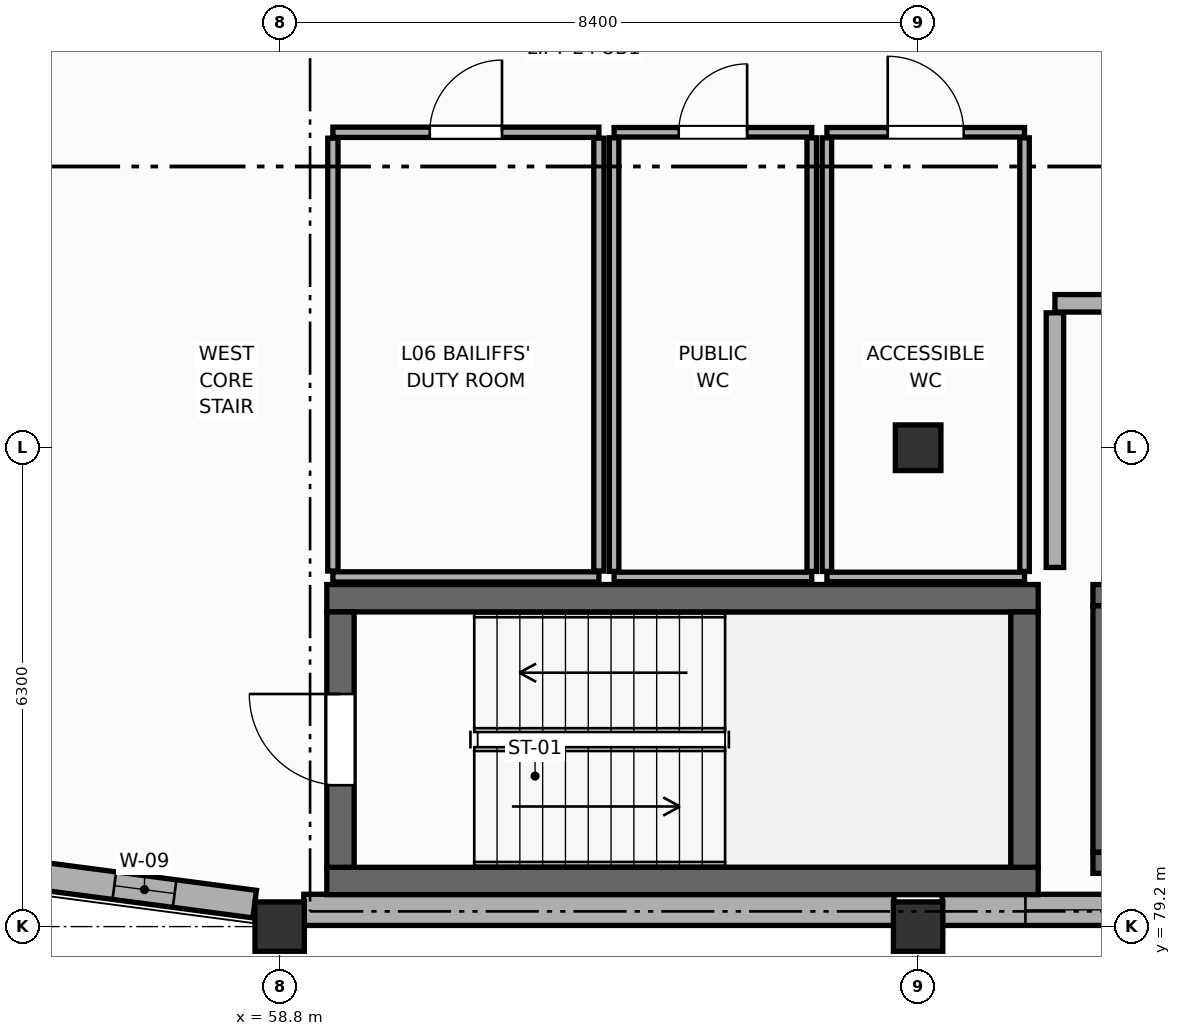
"""IFC4 building model, lengths in metres.
Left out: names, types, materials, properties, quantities, classifications, styles, units other than length and angle.
Written with IfcOpenShell. Run it as: python <this file> out.ifc"""

import sys

from ifc_helpers import new_model, si_unit, direction, frame, frame_2d, origin, origin_2d, place, context, subcontext, project, spatial, rectangle, extrude, element, fill, save


model = new_model("IFC4")
c1 = context("Model", 3, precision=1e-05, world=origin(), true_north=direction((0.0, 1.0)))
c2 = subcontext(c1, "Body", "Model", "MODEL_VIEW")
j1 = project(units=[si_unit("LENGTHUNIT", "METRE"), si_unit("PLANEANGLEUNIT", "RADIAN")], contexts=[c1])
p1 = place(None, origin())
s1 = spatial("IfcSite", under=j1, at=p1, CompositionType="ELEMENT")
p2 = place(p1, origin())
s2 = spatial("IfcBuilding", under=s1, at=p2, CompositionType="ELEMENT")
p3 = place(p2, frame((0.0, 0.0, 22.8)))
s3 = spatial("IfcBuildingStorey", under=s2, at=p3, CompositionType="ELEMENT", Elevation=22.8)
for number, where, z_axis, x_axis in (
    (1, (58.8, 79.2, 0.0), (0.0, 0.0, 1.0), (1.0, 0.0, 0.0)),
    (2, (67.2, 79.2, 0.0), (0.0, 0.0, 1.0), (1.0, 0.0, 0.0)),
):
    element("IfcColumn", number, at=place(p3, frame(where, z_axis=z_axis, x_axis=x_axis)), inside=s3, PredefinedType="COLUMN", context=c2, shape_type="SweptSolid", body=[
        extrude(rectangle(XDim=0.65, YDim=0.65, at=origin_2d()), origin(), (0.0, 0.0, 1.0), 4.2),
    ])
p4 = place(p3, frame((67.2, 85.5, 0.0), z_axis=(0.0, 0.0, 1.0), x_axis=(1.0, 0.0, 0.0)))
e3 = element("IfcColumn", 3, at=p4, inside=s3, PredefinedType="COLUMN", context=c2, shape_type="SweptSolid", body=[
    extrude(rectangle(XDim=0.6, YDim=0.6, at=origin_2d()), origin(), (0.0, 0.0, 1.0), 4.2),
])
p5 = place(p3, frame((66.883, 79.42, 0.0), z_axis=(0.0, 0.0, 1.0), x_axis=(-1.0, 0.0, 0.0)))
e4 = element("IfcWall", 4, at=p5, inside=s3, PredefinedType="STANDARD", context=c2, shape_type="SweptSolid", body=[
    extrude(rectangle(XDim=7.766, YDim=0.41, at=frame_2d((3.883, 0.0))), origin(), (0.0, 0.0, 1.0), 3.1),
])
p6 = place(p3, frame((75.283, 79.42, 0.0), z_axis=(0.0, 0.0, 1.0), x_axis=(-1.0, 0.0, 0.0)))
e5 = element("IfcWall", 5, at=p6, inside=s3, PredefinedType="STANDARD", context=c2, shape_type="SweptSolid", body=[
    extrude(rectangle(XDim=7.766, YDim=0.41, at=frame_2d((3.883, 0.0))), origin(), (0.0, 0.0, 1.0), 3.5),
])
p7 = place(p6, frame((1.095, 0.0, 0.85)))
e6 = element("IfcOpeningElement", 6, at=p7, cuts=e5, PredefinedType="OPENING", context=c2, shape_type="SweptSolid", body=[
    extrude(rectangle(XDim=1.35, YDim=1.95, at=frame_2d((0.675, 0.975))), frame((0.0, 0.215, 0.0), z_axis=(0.0, -1.0, 0.0), x_axis=(1.0, 0.0, 0.0)), (0.0, 0.0, 1.0), 0.43),
])
p8 = place(p6, frame((3.208, 0.0, 0.85)))
e7 = element("IfcOpeningElement", 7, at=p8, cuts=e5, PredefinedType="OPENING", context=c2, shape_type="SweptSolid", body=[
    extrude(rectangle(XDim=1.35, YDim=1.95, at=frame_2d((0.675, 0.975))), frame((0.0, 0.215, 0.0), z_axis=(0.0, -1.0, 0.0), x_axis=(1.0, 0.0, 0.0)), (0.0, 0.0, 1.0), 0.43),
])
p9 = place(p6, frame((5.321, 0.0, 0.85)))
e8 = element("IfcOpeningElement", 8, at=p9, cuts=e5, PredefinedType="OPENING", context=c2, shape_type="SweptSolid", body=[
    extrude(rectangle(XDim=1.35, YDim=1.95, at=frame_2d((0.675, 0.975))), frame((0.0, 0.215, 0.0), z_axis=(0.0, -1.0, 0.0), x_axis=(1.0, 0.0, 0.0)), (0.0, 0.0, 1.0), 0.43),
])
p10 = place(p3, frame((55.572, 79.877, 0.0), z_axis=(0.0, 0.0, 1.0), x_axis=(0.99144889538, -0.13049554724, 0.0)))
e9 = element("IfcWall", 9, at=p10, inside=s3, PredefinedType="ELEMENTEDWALL", context=c2, shape_type="SweptSolid", body=[
    extrude(rectangle(XDim=2.924, YDim=0.365, at=frame_2d((1.462, 0.0))), origin(), (0.0, 0.0, 1.0), 3.1),
])
p11 = place(p10, frame((1.062, 0.0, 0.85)))
e10 = element("IfcOpeningElement", 10, at=p11, cuts=e9, PredefinedType="OPENING", context=c2, shape_type="SweptSolid", body=[
    extrude(rectangle(XDim=0.8, YDim=1.7, at=frame_2d((0.4, 0.85))), frame((0.0, 0.192, 0.0), z_axis=(0.0, -1.0, 0.0), x_axis=(1.0, 0.0, 0.0)), (0.0, 0.0, 1.0), 0.385),
])
for number, where, z_axis, x_axis in (
    (11, (59.42, 83.52, 0.0), (0.0, 0.0, 1.0), (1.0, 0.0, 0.0)),
    (12, (68.78, 79.8, 0.0), (0.0, 0.0, 1.0), (-1.0, 0.0, 0.0)),
):
    element("IfcWall", number, at=place(p3, frame(where, z_axis=z_axis, x_axis=x_axis)), inside=s3, PredefinedType="SHEAR", context=c2, shape_type="SweptSolid", body=[
        extrude(rectangle(XDim=9.36, YDim=0.36, at=frame_2d((4.68, 0.0))), origin(), (0.0, 0.0, 1.0), 3.97),
    ])
p12 = place(p3, frame((59.6, 79.98, 0.0), z_axis=(0.0, 0.0, 1.0), x_axis=(0.0, 1.0, 0.0)))
e13 = element("IfcWall", 13, at=p12, inside=s3, PredefinedType="SHEAR", context=c2, shape_type="SweptSolid", body=[
    extrude(rectangle(XDim=3.36, YDim=0.36, at=frame_2d((1.68, 0.0))), origin(), (0.0, 0.0, 1.0), 3.97),
])
p13 = place(p12, frame((1.08, 0.0, 0.0)))
e14 = element("IfcOpeningElement", 14, at=p13, cuts=e13, PredefinedType="OPENING", context=c2, shape_type="SweptSolid", body=[
    extrude(rectangle(XDim=1.2, YDim=2.2, at=frame_2d((0.6, 1.1))), frame((0.0, 0.19, 0.0), z_axis=(0.0, -1.0, 0.0), x_axis=(1.0, 0.0, 0.0)), (0.0, 0.0, 1.0), 0.38),
])
p14 = place(p3, frame((68.6, 83.34, 0.0), z_axis=(0.0, 0.0, 1.0), x_axis=(0.0, -1.0, 0.0)))
e15 = element("IfcWall", 15, at=p14, inside=s3, PredefinedType="SHEAR", context=c2, shape_type="SweptSolid", body=[
    extrude(rectangle(XDim=3.36, YDim=0.36, at=frame_2d((1.68, 0.0))), origin(), (0.0, 0.0, 1.0), 3.97),
])
p15 = place(p3, frame((69.5, 83.56, 0.0), z_axis=(0.0, 0.0, 1.0), x_axis=(1.0, 0.0, 0.0)))
e16 = element("IfcWall", 16, at=p15, inside=s3, PredefinedType="SHEAR", context=c2, shape_type="SweptSolid", body=[
    extrude(rectangle(XDim=3.0, YDim=0.28, at=frame_2d((1.5, 0.0))), origin(), (0.0, 0.0, 1.0), 3.97),
])
p16 = place(p15, frame((0.95, 0.0, 0.0)))
e17 = element("IfcOpeningElement", 17, at=p16, cuts=e16, PredefinedType="OPENING", context=c2, shape_type="SweptSolid", body=[
    extrude(rectangle(XDim=1.1, YDim=2.2, at=frame_2d((0.55, 1.1))), frame((0.0, 0.15, 0.0), z_axis=(0.0, -1.0, 0.0), x_axis=(1.0, 0.0, 0.0)), (0.0, 0.0, 1.0), 0.3),
])
p17 = place(p3, frame((72.5, 80.04, 0.0), z_axis=(0.0, 0.0, 1.0), x_axis=(-1.0, 0.0, 0.0)))
e18 = element("IfcWall", 18, at=p17, inside=s3, PredefinedType="SHEAR", context=c2, shape_type="SweptSolid", body=[
    extrude(rectangle(XDim=3.0, YDim=0.28, at=frame_2d((1.5, 0.0))), origin(), (0.0, 0.0, 1.0), 3.97),
])
p18 = place(p3, frame((69.64, 80.18, 0.0), z_axis=(0.0, 0.0, 1.0), x_axis=(0.0, 1.0, 0.0)))
e19 = element("IfcWall", 19, at=p18, inside=s3, PredefinedType="SHEAR", context=c2, shape_type="SweptSolid", body=[
    extrude(rectangle(XDim=3.24, YDim=0.28, at=frame_2d((1.62, 0.0))), origin(), (0.0, 0.0, 1.0), 3.97),
])
p19 = place(p3, frame((69.0, 87.4, 0.0), z_axis=(0.0, 0.0, 1.0), x_axis=(1.0, 0.0, 0.0)))
e20 = element("IfcWall", 20, at=p19, inside=s3, PredefinedType="STANDARD", context=c2, shape_type="SweptSolid", body=[
    extrude(rectangle(XDim=5.4, YDim=0.23, at=frame_2d((2.7, 0.0))), origin(), (0.0, 0.0, 1.0), 3.955),
])
p20 = place(p19, frame((2.05, 0.0, 0.0)))
e21 = element("IfcOpeningElement", 21, at=p20, cuts=e20, PredefinedType="OPENING", context=c2, shape_type="SweptSolid", body=[
    extrude(rectangle(XDim=1.3, YDim=2.2, at=frame_2d((0.65, 1.1))), frame((0.0, 0.125, 0.0), z_axis=(0.0, -1.0, 0.0), x_axis=(1.0, 0.0, 0.0)), (0.0, 0.0, 1.0), 0.25),
])
p21 = place(p3, frame((69.0, 83.925, 0.0), z_axis=(0.0, 0.0, 1.0), x_axis=(0.0, 1.0, 0.0)))
e22 = element("IfcWall", 22, at=p21, inside=s3, PredefinedType="STANDARD", context=c2, shape_type="SweptSolid", body=[
    extrude(rectangle(XDim=3.35, YDim=0.23, at=frame_2d((1.675, 0.0))), origin(), (0.0, 0.0, 1.0), 3.4),
])
p22 = place(p3, frame((63.2, 89.65, 0.0), z_axis=(0.0, 0.0, 1.0), x_axis=(1.0, 0.0, 0.0)))
e23 = element("IfcWall", 23, at=p22, inside=s3, PredefinedType="PARTITIONING", context=c2, shape_type="SweptSolid", body=[
    extrude(rectangle(XDim=2.6, YDim=0.125, at=frame_2d((1.3, 0.0))), origin(), (0.0, 0.0, 1.0), 3.955),
])
p23 = place(p22, frame((0.85, 0.0, 0.0)))
e24 = element("IfcOpeningElement", 24, at=p23, cuts=e23, PredefinedType="OPENING", context=c2, shape_type="SweptSolid", body=[
    extrude(rectangle(XDim=0.9, YDim=2.1, at=frame_2d((0.45, 1.05))), frame((0.0, 0.073, 0.0), z_axis=(0.0, -1.0, 0.0), x_axis=(1.0, 0.0, 0.0)), (0.0, 0.0, 1.0), 0.145),
])
p24 = place(p3, frame((65.8, 83.8, 0.0), z_axis=(0.0, 0.0, 1.0), x_axis=(-1.0, 0.0, 0.0)))
e25 = element("IfcWall", 25, at=p24, inside=s3, PredefinedType="PARTITIONING", context=c2, shape_type="SweptSolid", body=[
    extrude(rectangle(XDim=2.6, YDim=0.125, at=frame_2d((1.3, 0.0))), origin(), (0.0, 0.0, 1.0), 3.955),
])
for number, where, z_axis, x_axis in (
    (26, (63.2, 83.873, 0.0), (0.0, 0.0, 1.0), (0.0, 1.0, 0.0)),
    (27, (65.8, 89.577, 0.0), (0.0, 0.0, 1.0), (0.0, -1.0, 0.0)),
):
    element("IfcWall", number, at=place(p3, frame(where, z_axis=z_axis, x_axis=x_axis)), inside=s3, PredefinedType="PARTITIONING", context=c2, shape_type="SweptSolid", body=[
        extrude(rectangle(XDim=5.705, YDim=0.125, at=frame_2d((2.853, 0.0))), origin(), (0.0, 0.0, 1.0), 3.955),
    ])
p25 = place(p3, frame((66.0, 89.65, 0.0), z_axis=(0.0, 0.0, 1.0), x_axis=(1.0, 0.0, 0.0)))
e28 = element("IfcWall", 28, at=p25, inside=s3, PredefinedType="PARTITIONING", context=c2, shape_type="SweptSolid", body=[
    extrude(rectangle(XDim=2.6, YDim=0.125, at=frame_2d((1.3, 0.0))), origin(), (0.0, 0.0, 1.0), 3.5),
])
p26 = place(p25, frame((0.8, 0.0, 0.0)))
e29 = element("IfcOpeningElement", 29, at=p26, cuts=e28, PredefinedType="OPENING", context=c2, shape_type="SweptSolid", body=[
    extrude(rectangle(XDim=1.0, YDim=2.1, at=frame_2d((0.5, 1.05))), frame((0.0, 0.073, 0.0), z_axis=(0.0, -1.0, 0.0), x_axis=(1.0, 0.0, 0.0)), (0.0, 0.0, 1.0), 0.145),
])
p27 = place(p3, frame((68.6, 83.8, 0.0), z_axis=(0.0, 0.0, 1.0), x_axis=(-1.0, 0.0, 0.0)))
e30 = element("IfcWall", 30, at=p27, inside=s3, PredefinedType="PARTITIONING", context=c2, shape_type="SweptSolid", body=[
    extrude(rectangle(XDim=2.6, YDim=0.125, at=frame_2d((1.3, 0.0))), origin(), (0.0, 0.0, 1.0), 3.5),
])
p28 = place(p3, frame((66.0, 83.873, 0.0), z_axis=(0.0, 0.0, 1.0), x_axis=(0.0, 1.0, 0.0)))
e31 = element("IfcWall", 31, at=p28, inside=s3, PredefinedType="PARTITIONING", context=c2, shape_type="SweptSolid", body=[
    extrude(rectangle(XDim=5.705, YDim=0.125, at=frame_2d((2.853, 0.0))), origin(), (0.0, 0.0, 1.0), 3.955),
])
p29 = place(p3, frame((68.6, 89.577, 0.0), z_axis=(0.0, 0.0, 1.0), x_axis=(0.0, -1.0, 0.0)))
e32 = element("IfcWall", 32, at=p29, inside=s3, PredefinedType="PARTITIONING", context=c2, shape_type="SweptSolid", body=[
    extrude(rectangle(XDim=5.705, YDim=0.125, at=frame_2d((2.853, 0.0))), origin(), (0.0, 0.0, 1.0), 3.4),
])
p30 = place(p3, frame((59.5, 89.65, 0.0), z_axis=(0.0, 0.0, 1.0), x_axis=(1.0, 0.0, 0.0)))
e33 = element("IfcWall", 33, at=p30, inside=s3, PredefinedType="PARTITIONING", context=c2, shape_type="SweptSolid", body=[
    extrude(rectangle(XDim=3.5, YDim=0.135, at=frame_2d((1.75, 0.0))), origin(), (0.0, 0.0, 1.0), 3.955),
])
p31 = place(p30, frame((1.275, 0.0, 0.0)))
e34 = element("IfcOpeningElement", 34, at=p31, cuts=e33, PredefinedType="OPENING", context=c2, shape_type="SweptSolid", body=[
    extrude(rectangle(XDim=0.95, YDim=2.15, at=frame_2d((0.475, 1.075))), frame((0.0, 0.077, 0.0), z_axis=(0.0, -1.0, 0.0), x_axis=(1.0, 0.0, 0.0)), (0.0, 0.0, 1.0), 0.155),
])
p32 = place(p3, frame((63.0, 83.8, 0.0), z_axis=(0.0, 0.0, 1.0), x_axis=(-1.0, 0.0, 0.0)))
e35 = element("IfcWall", 35, at=p32, inside=s3, PredefinedType="PARTITIONING", context=c2, shape_type="SweptSolid", body=[
    extrude(rectangle(XDim=3.5, YDim=0.135, at=frame_2d((1.75, 0.0))), origin(), (0.0, 0.0, 1.0), 3.955),
])
for number, where, z_axis, x_axis in (
    (36, (59.5, 83.877, 0.0), (0.0, 0.0, 1.0), (0.0, 1.0, 0.0)),
    (37, (63.0, 89.573, 0.0), (0.0, 0.0, 1.0), (0.0, -1.0, 0.0)),
):
    element("IfcWall", number, at=place(p3, frame(where, z_axis=z_axis, x_axis=x_axis)), inside=s3, PredefinedType="PARTITIONING", context=c2, shape_type="SweptSolid", body=[
        extrude(rectangle(XDim=5.695, YDim=0.135, at=frame_2d((2.848, 0.0))), origin(), (0.0, 0.0, 1.0), 3.955),
    ])
p33 = place(p9, origin())
e38 = element("IfcWindow", 38, at=p33, inside=s3, PartitioningType="SINGLE_PANEL", PredefinedType="WINDOW", context=c2, shape_type="SweptSolid", body=[
    extrude(rectangle(XDim=1.35, YDim=1.95, at=frame_2d((0.675, 0.975))), frame((0.0, 0.03, 0.0), z_axis=(0.0, -1.0, 0.0), x_axis=(1.0, 0.0, 0.0)), (0.0, 0.0, 1.0), 0.06),
])
fill(e8, e38)
p34 = place(p11, origin())
e39 = element("IfcWindow", 39, at=p34, inside=s3, PartitioningType="SINGLE_PANEL", PredefinedType="WINDOW", context=c2, shape_type="SweptSolid", body=[
    extrude(rectangle(XDim=0.8, YDim=1.7, at=frame_2d((0.4, 0.85))), frame((0.0, 0.03, 0.0), z_axis=(0.0, -1.0, 0.0), x_axis=(1.0, 0.0, 0.0)), (0.0, 0.0, 1.0), 0.06),
])
fill(e10, e39)
p35 = place(p13, origin())
e40 = element("IfcDoor", 40, at=p35, inside=s3, OperationType="SINGLE_SWING_RIGHT", PredefinedType="DOOR", context=c2, shape_type="SweptSolid", body=[
    extrude(rectangle(XDim=1.2, YDim=2.2, at=frame_2d((0.6, 1.1))), frame((0.0, 0.025, 0.0), z_axis=(0.0, -1.0, 0.0), x_axis=(1.0, 0.0, 0.0)), (0.0, 0.0, 1.0), 0.05),
])
fill(e14, e40)
p36 = place(p23, origin())
e41 = element("IfcDoor", 41, at=p36, inside=s3, OperationType="SINGLE_SWING_RIGHT", PredefinedType="DOOR", context=c2, shape_type="SweptSolid", body=[
    extrude(rectangle(XDim=0.9, YDim=2.1, at=frame_2d((0.45, 1.05))), frame((0.0, 0.025, 0.0), z_axis=(0.0, -1.0, 0.0), x_axis=(1.0, 0.0, 0.0)), (0.0, 0.0, 1.0), 0.05),
])
fill(e24, e41)
p37 = place(p26, origin())
e42 = element("IfcDoor", 42, at=p37, inside=s3, OperationType="SINGLE_SWING_LEFT", PredefinedType="DOOR", context=c2, shape_type="SweptSolid", body=[
    extrude(rectangle(XDim=1.0, YDim=2.1, at=frame_2d((0.5, 1.05))), frame((0.0, 0.025, 0.0), z_axis=(0.0, -1.0, 0.0), x_axis=(1.0, 0.0, 0.0)), (0.0, 0.0, 1.0), 0.05),
])
fill(e29, e42)
p38 = place(p31, origin())
e43 = element("IfcDoor", 43, at=p38, inside=s3, OperationType="SINGLE_SWING_RIGHT", PredefinedType="DOOR", context=c2, shape_type="SweptSolid", body=[
    extrude(rectangle(XDim=0.95, YDim=2.15, at=frame_2d((0.475, 1.075))), frame((0.0, 0.025, 0.0), z_axis=(0.0, -1.0, 0.0), x_axis=(1.0, 0.0, 0.0)), (0.0, 0.0, 1.0), 0.05),
])
fill(e34, e43)
save(model, sys.argv[1])
